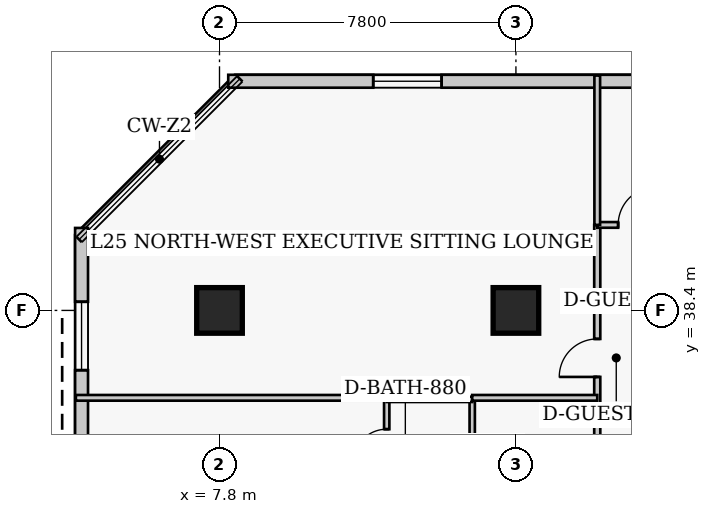
"""IFC4 building model, lengths in metres.
Left out: names, types, materials, properties, quantities, classifications, styles, units other than length and angle.
Written with IfcOpenShell. Run it as: python <this file> out.ifc"""

import sys

from ifc_helpers import new_model, si_unit, direction, frame, frame_2d, origin, origin_2d, place, context, subcontext, project, spatial, rectangle, extrude, element, fill, save


model = new_model("IFC4")
c1 = context("Model", 3, precision=1e-05, world=origin(), true_north=direction((0.0, 1.0)))
c2 = subcontext(c1, "Body", "Model", "MODEL_VIEW")
j1 = project(units=[si_unit("LENGTHUNIT", "METRE"), si_unit("PLANEANGLEUNIT", "RADIAN")], contexts=[c1])
p1 = place(None, origin())
s1 = spatial("IfcSite", under=j1, at=p1, CompositionType="ELEMENT")
p2 = place(p1, origin())
s2 = spatial("IfcBuilding", under=s1, at=p2, CompositionType="ELEMENT")
p3 = place(p2, frame((0.0, 0.0, 103.2)))
s3 = spatial("IfcBuildingStorey", under=s2, at=p3, CompositionType="ELEMENT", Elevation=103.2)
for number, where, z_axis, x_axis in (
    (1, (7.8, 38.4, 0.0), (0.0, 0.0, 1.0), (1.0, 0.0, 0.0)),
    (2, (15.6, 38.4, 0.0), (0.0, 0.0, 1.0), (1.0, 0.0, 0.0)),
):
    element("IfcColumn", number, at=place(p3, frame(where, z_axis=z_axis, x_axis=x_axis)), inside=s3, PredefinedType="COLUMN", context=c2, shape_type="SweptSolid", body=[
        extrude(rectangle(XDim=1.2, YDim=1.2, at=origin_2d()), origin(), (0.0, 0.0, 1.0), 3.8),
    ])
p4 = place(p3, frame((36.32, 44.43, 0.0), z_axis=(0.0, 0.0, 1.0), x_axis=(-1.0, 0.0, 0.0)))
e3 = element("IfcWall", 3, at=p4, inside=s3, PredefinedType="SOLIDWALL", context=c2, shape_type="SweptSolid", body=[
    extrude(rectangle(XDim=28.29, YDim=0.34, at=frame_2d((14.145, 0.0))), origin(), (0.0, 0.0, 1.0), 3.54),
])
p5 = place(p4, frame((3.815, 0.0, 0.85)))
e4 = element("IfcOpeningElement", 4, at=p5, cuts=e3, PredefinedType="OPENING", context=c2, shape_type="SweptSolid", body=[
    extrude(rectangle(XDim=1.8, YDim=1.8, at=frame_2d((0.9, 0.9))), frame((0.0, 0.18, 0.0), z_axis=(0.0, -1.0, 0.0), x_axis=(1.0, 0.0, 0.0)), (0.0, 0.0, 1.0), 0.36),
])
p6 = place(p4, frame((13.245, 0.0, 0.85)))
e5 = element("IfcOpeningElement", 5, at=p6, cuts=e3, PredefinedType="OPENING", context=c2, shape_type="SweptSolid", body=[
    extrude(rectangle(XDim=1.8, YDim=1.8, at=frame_2d((0.9, 0.9))), frame((0.0, 0.18, 0.0), z_axis=(0.0, -1.0, 0.0), x_axis=(1.0, 0.0, 0.0)), (0.0, 0.0, 1.0), 0.36),
])
p7 = place(p4, frame((22.675, 0.0, 0.85)))
e6 = element("IfcOpeningElement", 6, at=p7, cuts=e3, PredefinedType="OPENING", context=c2, shape_type="SweptSolid", body=[
    extrude(rectangle(XDim=1.8, YDim=1.8, at=frame_2d((0.9, 0.9))), frame((0.0, 0.18, 0.0), z_axis=(0.0, -1.0, 0.0), x_axis=(1.0, 0.0, 0.0)), (0.0, 0.0, 1.0), 0.36),
])
p8 = place(p3, frame((4.17, 40.57, 0.0), z_axis=(0.0, 0.0, 1.0), x_axis=(0.0, -1.0, 0.0)))
e7 = element("IfcWall", 7, at=p8, inside=s3, PredefinedType="SOLIDWALL", context=c2, shape_type="SweptSolid", body=[
    extrude(rectangle(XDim=31.94, YDim=0.34, at=frame_2d((15.97, 0.0))), origin(), (0.0, 0.0, 1.0), 3.54),
])
p9 = place(p8, frame((1.942, 0.0, 0.85)))
e8 = element("IfcOpeningElement", 8, at=p9, cuts=e7, PredefinedType="OPENING", context=c2, shape_type="SweptSolid", body=[
    extrude(rectangle(XDim=1.8, YDim=1.8, at=frame_2d((0.9, 0.9))), frame((0.0, 0.18, 0.0), z_axis=(0.0, -1.0, 0.0), x_axis=(1.0, 0.0, 0.0)), (0.0, 0.0, 1.0), 0.36),
])
p10 = place(p8, frame((11.077, 0.0, 0.85)))
e9 = element("IfcOpeningElement", 9, at=p10, cuts=e7, PredefinedType="OPENING", context=c2, shape_type="SweptSolid", body=[
    extrude(rectangle(XDim=1.8, YDim=1.8, at=frame_2d((0.9, 0.9))), frame((0.0, 0.18, 0.0), z_axis=(0.0, -1.0, 0.0), x_axis=(1.0, 0.0, 0.0)), (0.0, 0.0, 1.0), 0.36),
])
p11 = place(p8, frame((18.413, 0.0, 0.85)))
e10 = element("IfcOpeningElement", 10, at=p11, cuts=e7, PredefinedType="OPENING", context=c2, shape_type="SweptSolid", body=[
    extrude(rectangle(XDim=1.8, YDim=1.8, at=frame_2d((0.9, 0.9))), frame((0.0, 0.18, 0.0), z_axis=(0.0, -1.0, 0.0), x_axis=(1.0, 0.0, 0.0)), (0.0, 0.0, 1.0), 0.36),
])
p12 = place(p8, frame((27.048, 0.0, 0.85)))
e11 = element("IfcOpeningElement", 11, at=p12, cuts=e7, PredefinedType="OPENING", context=c2, shape_type="SweptSolid", body=[
    extrude(rectangle(XDim=1.8, YDim=1.8, at=frame_2d((0.9, 0.9))), frame((0.0, 0.18, 0.0), z_axis=(0.0, -1.0, 0.0), x_axis=(1.0, 0.0, 0.0)), (0.0, 0.0, 1.0), 0.36),
])
p13 = place(p3, frame((17.74, 6.65, 0.0), z_axis=(0.0, 0.0, 1.0), x_axis=(0.0, 1.0, 0.0)))
e12 = element("IfcWall", 12, at=p13, inside=s3, PredefinedType="PARTITIONING", context=c2, shape_type="SweptSolid", body=[
    extrude(rectangle(XDim=34.0, YDim=0.16, at=frame_2d((17.0, 0.0))), origin(), (0.0, 0.0, 1.0), 3.54),
])
p14 = place(p13, frame((1.8, 0.0, 0.0)))
e13 = element("IfcOpeningElement", 13, at=p14, cuts=e12, PredefinedType="OPENING", context=c2, shape_type="SweptSolid", body=[
    extrude(rectangle(XDim=0.95, YDim=2.1, at=frame_2d((0.475, 1.05))), frame((0.0, 0.09, 0.0), z_axis=(0.0, -1.0, 0.0), x_axis=(1.0, 0.0, 0.0)), (0.0, 0.0, 1.0), 0.18),
])
p15 = place(p13, frame((8.475, 0.0, 0.0)))
e14 = element("IfcOpeningElement", 14, at=p15, cuts=e12, PredefinedType="OPENING", context=c2, shape_type="SweptSolid", body=[
    extrude(rectangle(XDim=0.95, YDim=2.1, at=frame_2d((0.475, 1.05))), frame((0.0, 0.09, 0.0), z_axis=(0.0, -1.0, 0.0), x_axis=(1.0, 0.0, 0.0)), (0.0, 0.0, 1.0), 0.18),
])
p16 = place(p13, frame((14.255, 0.0, 0.0)))
e15 = element("IfcOpeningElement", 15, at=p16, cuts=e12, PredefinedType="OPENING", context=c2, shape_type="SweptSolid", body=[
    extrude(rectangle(XDim=0.95, YDim=2.1, at=frame_2d((0.475, 1.05))), frame((0.0, 0.09, 0.0), z_axis=(0.0, -1.0, 0.0), x_axis=(1.0, 0.0, 0.0)), (0.0, 0.0, 1.0), 0.18),
])
p17 = place(p13, frame((30.0, 0.0, 0.0)))
e16 = element("IfcOpeningElement", 16, at=p17, cuts=e12, PredefinedType="OPENING", context=c2, shape_type="SweptSolid", body=[
    extrude(rectangle(XDim=1.0, YDim=2.15, at=frame_2d((0.5, 1.075))), frame((0.0, 0.09, 0.0), z_axis=(0.0, -1.0, 0.0), x_axis=(1.0, 0.0, 0.0)), (0.0, 0.0, 1.0), 0.18),
])
p18 = place(p3, frame((17.74, 40.65, 0.0), z_axis=(0.0, 0.0, 1.0), x_axis=(1.0, 0.0, 0.0)))
e17 = element("IfcWall", 17, at=p18, inside=s3, PredefinedType="PARTITIONING", context=c2, shape_type="SweptSolid", body=[
    extrude(rectangle(XDim=4.36, YDim=0.15, at=frame_2d((2.18, 0.0))), origin(), (0.0, 0.0, 1.0), 3.54),
])
p19 = place(p18, frame((0.55, 0.0, 0.0)))
e18 = element("IfcOpeningElement", 18, at=p19, cuts=e17, PredefinedType="OPENING", context=c2, shape_type="SweptSolid", body=[
    extrude(rectangle(XDim=1.0, YDim=2.15, at=frame_2d((0.5, 1.075))), frame((0.0, 0.085, 0.0), z_axis=(0.0, -1.0, 0.0), x_axis=(1.0, 0.0, 0.0)), (0.0, 0.0, 1.0), 0.17),
])
p20 = place(p3, frame((17.74, 40.65, 0.0), z_axis=(0.0, 0.0, 1.0), x_axis=(0.0, 1.0, 0.0)))
e19 = element("IfcWall", 19, at=p20, inside=s3, PredefinedType="PARTITIONING", context=c2, shape_type="SweptSolid", body=[
    extrude(rectangle(XDim=3.93, YDim=0.15, at=frame_2d((1.965, 0.0))), origin(), (0.0, 0.0, 1.0), 3.54),
])
p21 = place(p3, frame((12.2, 33.61, 0.0), z_axis=(0.0, 0.0, 1.0), x_axis=(0.0, 1.0, 0.0)))
e20 = element("IfcWall", 20, at=p21, inside=s3, PredefinedType="PLUMBINGWALL", context=c2, shape_type="SweptSolid", body=[
    extrude(rectangle(XDim=2.45, YDim=0.14, at=frame_2d((1.225, 0.0))), origin(), (0.0, 0.0, 1.0), 3.54),
])
p22 = place(p21, frame((0.785, 0.0, 0.0)))
e21 = element("IfcOpeningElement", 21, at=p22, cuts=e20, PredefinedType="OPENING", context=c2, shape_type="SweptSolid", body=[
    extrude(rectangle(XDim=0.88, YDim=2.05, at=frame_2d((0.44, 1.025))), frame((0.0, 0.08, 0.0), z_axis=(0.0, -1.0, 0.0), x_axis=(1.0, 0.0, 0.0)), (0.0, 0.0, 1.0), 0.16),
])
p23 = place(p3, frame((14.45, 33.61, 0.0), z_axis=(0.0, 0.0, 1.0), x_axis=(0.0, 1.0, 0.0)))
e22 = element("IfcWall", 22, at=p23, inside=s3, PredefinedType="PLUMBINGWALL", context=c2, shape_type="SweptSolid", body=[
    extrude(rectangle(XDim=2.45, YDim=0.14, at=frame_2d((1.225, 0.0))), origin(), (0.0, 0.0, 1.0), 3.54),
])
p24 = place(p3, frame((12.2, 36.06, 0.0), z_axis=(0.0, 0.0, 1.0), x_axis=(1.0, 0.0, 0.0)))
e23 = element("IfcWall", 23, at=p24, inside=s3, PredefinedType="PLUMBINGWALL", context=c2, shape_type="SweptSolid", body=[
    extrude(rectangle(XDim=2.25, YDim=0.14, at=frame_2d((1.125, 0.0))), origin(), (0.0, 0.0, 1.0), 3.54),
])
p25 = place(p3, frame((4.02, 36.1, 0.0), z_axis=(0.0, 0.0, 1.0), x_axis=(1.0, 0.0, 0.0)))
e24 = element("IfcWall", 24, at=p25, inside=s3, PredefinedType="PARTITIONING", context=c2, shape_type="SweptSolid", body=[
    extrude(rectangle(XDim=8.18, YDim=0.15, at=frame_2d((4.09, 0.0))), origin(), (0.0, 0.0, 1.0), 3.54),
])
p26 = place(p3, frame((14.45, 36.1, 0.0), z_axis=(0.0, 0.0, 1.0), x_axis=(1.0, 0.0, 0.0)))
e25 = element("IfcWall", 25, at=p26, inside=s3, PredefinedType="PARTITIONING", context=c2, shape_type="SweptSolid", body=[
    extrude(rectangle(XDim=3.29, YDim=0.15, at=frame_2d((1.645, 0.0))), origin(), (0.0, 0.0, 1.0), 3.54),
])
p27 = place(p7, origin())
e26 = element("IfcWindow", 26, at=p27, inside=s3, PartitioningType="SINGLE_PANEL", PredefinedType="WINDOW", context=c2, shape_type="SweptSolid", body=[
    extrude(rectangle(XDim=1.8, YDim=1.8, at=frame_2d((0.9, 0.9))), frame((0.0, 0.03, 0.0), z_axis=(0.0, -1.0, 0.0), x_axis=(1.0, 0.0, 0.0)), (0.0, 0.0, 1.0), 0.06),
])
fill(e6, e26)
p28 = place(p9, origin())
e27 = element("IfcWindow", 27, at=p28, inside=s3, PartitioningType="SINGLE_PANEL", PredefinedType="WINDOW", context=c2, shape_type="SweptSolid", body=[
    extrude(rectangle(XDim=1.8, YDim=1.8, at=frame_2d((0.9, 0.9))), frame((0.0, 0.03, 0.0), z_axis=(0.0, -1.0, 0.0), x_axis=(1.0, 0.0, 0.0)), (0.0, 0.0, 1.0), 0.06),
])
fill(e8, e27)
p29 = place(p19, origin())
e28 = element("IfcDoor", 28, at=p29, inside=s3, OperationType="SINGLE_SWING_RIGHT", PredefinedType="DOOR", context=c2, shape_type="SweptSolid", body=[
    extrude(rectangle(XDim=1.0, YDim=2.15, at=frame_2d((0.5, 1.075))), frame((0.0, 0.025, 0.0), z_axis=(0.0, -1.0, 0.0), x_axis=(1.0, 0.0, 0.0)), (0.0, 0.0, 1.0), 0.05),
])
fill(e18, e28)
p30 = place(p22, origin())
e29 = element("IfcDoor", 29, at=p30, inside=s3, OperationType="SINGLE_SWING_LEFT", PredefinedType="DOOR", context=c2, shape_type="SweptSolid", body=[
    extrude(rectangle(XDim=0.88, YDim=2.05, at=frame_2d((0.44, 1.025))), frame((0.0, 0.025, 0.0), z_axis=(0.0, -1.0, 0.0), x_axis=(1.0, 0.0, 0.0)), (0.0, 0.0, 1.0), 0.05),
])
fill(e21, e29)
p31 = place(p17, origin())
e30 = element("IfcDoor", 30, at=p31, inside=s3, OperationType="SINGLE_SWING_LEFT", PredefinedType="DOOR", context=c2, shape_type="SweptSolid", body=[
    extrude(rectangle(XDim=1.0, YDim=2.15, at=frame_2d((0.5, 1.075))), frame((0.0, 0.025, 0.0), z_axis=(0.0, -1.0, 0.0), x_axis=(1.0, 0.0, 0.0)), (0.0, 0.0, 1.0), 0.05),
])
fill(e16, e30)
save(model, sys.argv[1])
